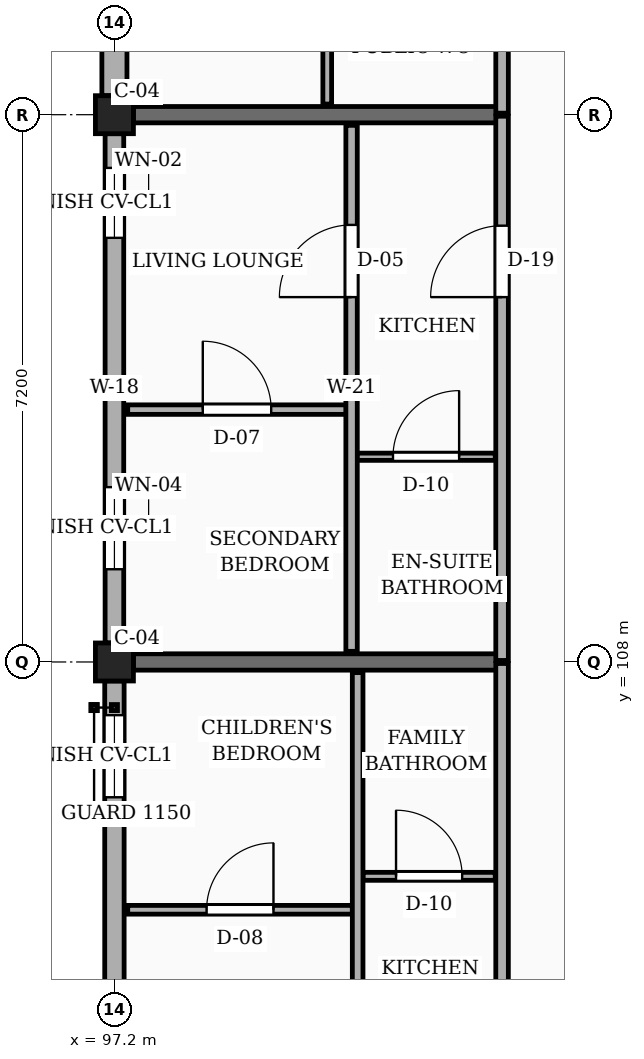
"""IFC4 building model, lengths in metres.
Left out: names, types, materials, properties, quantities, classifications, styles, units other than length and angle.
Written with IfcOpenShell. Run it as: python <this file> out.ifc"""

import sys

from ifc_helpers import new_model, si_unit, direction, frame, frame_2d, origin, origin_2d, place, context, subcontext, project, spatial, rectangle, extrude, element, fill, save


model = new_model("IFC4")
c1 = context("Model", 3, precision=1e-05, world=origin(), true_north=direction((0.0, 1.0)))
c2 = subcontext(c1, "Body", "Model", "MODEL_VIEW")
j1 = project(units=[si_unit("LENGTHUNIT", "METRE"), si_unit("PLANEANGLEUNIT", "RADIAN")], contexts=[c1])
p1 = place(None, origin())
s1 = spatial("IfcSite", under=j1, at=p1, CompositionType="ELEMENT")
p2 = place(p1, origin())
s2 = spatial("IfcBuilding", under=s1, at=p2, CompositionType="ELEMENT")
p3 = place(p2, frame((0.0, 0.0, 32.85)))
s3 = spatial("IfcBuildingStorey", under=s2, at=p3, CompositionType="ELEMENT", Elevation=32.85)
for number, where, z_axis, x_axis in (
    (1, (97.2, 108.0, 0.0), (0.0, 0.0, 1.0), (1.0, 0.0, 0.0)),
    (2, (97.2, 115.2, 0.0), (0.0, 0.0, 1.0), (1.0, 0.0, 0.0)),
):
    element("IfcColumn", number, at=place(p3, frame(where, z_axis=z_axis, x_axis=x_axis)), inside=s3, PredefinedType="COLUMN", context=c2, shape_type="SweptSolid", body=[
        extrude(rectangle(XDim=0.5, YDim=0.5, at=origin_2d()), origin(), (0.0, 0.0, 1.0), 3.15),
    ])
for number, where, z_axis, x_axis in (
    (3, (97.45, 108.0, 0.0), (0.0, 0.0, 1.0), (1.0, 0.0, 0.0)),
    (4, (97.45, 115.2, 0.0), (0.0, 0.0, 1.0), (1.0, 0.0, 0.0)),
):
    element("IfcWall", number, at=place(p3, frame(where, z_axis=z_axis, x_axis=x_axis)), inside=s3, PredefinedType="SOLIDWALL", context=c2, shape_type="SweptSolid", body=[
        extrude(rectangle(XDim=4.85, YDim=0.215, at=frame_2d((2.425, 0.0))), origin(), (0.0, 0.0, 1.0), 2.22),
    ])
p4 = place(p3, frame((97.2, 122.15, 0.0), z_axis=(0.0, 0.0, 1.0), x_axis=(0.0, -1.0, 0.0)))
e5 = element("IfcWall", 5, at=p4, inside=s3, PredefinedType="SOLIDWALL", context=c2, shape_type="SweptSolid", body=[
    extrude(rectangle(XDim=6.7, YDim=0.33, at=frame_2d((3.35, 0.0))), origin(), (0.0, 0.0, 1.0), 2.46),
])
p5 = place(p4, frame((0.45, 0.0, 0.78)))
e6 = element("IfcOpeningElement", 6, at=p5, cuts=e5, PredefinedType="OPENING", context=c2, shape_type="SweptSolid", body=[
    extrude(rectangle(XDim=1.45, YDim=1.44, at=frame_2d((0.725, 0.72))), frame((0.0, 0.175, 0.0), z_axis=(0.0, -1.0, 0.0), x_axis=(1.0, 0.0, 0.0)), (0.0, 0.0, 1.0), 0.35),
])
p6 = place(p4, frame((4.65, 0.0, 0.78)))
e7 = element("IfcOpeningElement", 7, at=p6, cuts=e5, PredefinedType="OPENING", context=c2, shape_type="SweptSolid", body=[
    extrude(rectangle(XDim=0.92, YDim=1.15, at=frame_2d((0.46, 0.575))), frame((0.0, 0.175, 0.0), z_axis=(0.0, -1.0, 0.0), x_axis=(1.0, 0.0, 0.0)), (0.0, 0.0, 1.0), 0.35),
])
p7 = place(p3, frame((97.2, 114.95, 0.0), z_axis=(0.0, 0.0, 1.0), x_axis=(0.0, -1.0, 0.0)))
e8 = element("IfcWall", 8, at=p7, inside=s3, PredefinedType="SOLIDWALL", context=c2, shape_type="SweptSolid", body=[
    extrude(rectangle(XDim=6.7, YDim=0.245, at=frame_2d((3.35, 0.0))), origin(), (0.0, 0.0, 1.0), 2.46),
])
p8 = place(p7, frame((0.45, 0.0, 0.78)))
e9 = element("IfcOpeningElement", 9, at=p8, cuts=e8, PredefinedType="OPENING", context=c2, shape_type="SweptSolid", body=[
    extrude(rectangle(XDim=0.92, YDim=1.15, at=frame_2d((0.46, 0.575))), frame((0.0, 0.133, 0.0), z_axis=(0.0, -1.0, 0.0), x_axis=(1.0, 0.0, 0.0)), (0.0, 0.0, 1.0), 0.265),
])
p9 = place(p7, frame((4.65, 0.0, 0.78)))
e10 = element("IfcOpeningElement", 10, at=p9, cuts=e8, PredefinedType="OPENING", context=c2, shape_type="SweptSolid", body=[
    extrude(rectangle(XDim=1.08, YDim=1.15, at=frame_2d((0.54, 0.575))), frame((0.0, 0.133, 0.0), z_axis=(0.0, -1.0, 0.0), x_axis=(1.0, 0.0, 0.0)), (0.0, 0.0, 1.0), 0.265),
])
p10 = place(p3, frame((97.2, 107.75, 0.0), z_axis=(0.0, 0.0, 1.0), x_axis=(0.0, -1.0, 0.0)))
e11 = element("IfcWall", 11, at=p10, inside=s3, PredefinedType="SOLIDWALL", context=c2, shape_type="SweptSolid", body=[
    extrude(rectangle(XDim=6.7, YDim=0.255, at=frame_2d((3.35, 0.0))), origin(), (0.0, 0.0, 1.0), 2.46),
])
p11 = place(p10, frame((0.45, 0.0, 0.78)))
e12 = element("IfcOpeningElement", 12, at=p11, cuts=e11, PredefinedType="OPENING", context=c2, shape_type="SweptSolid", body=[
    extrude(rectangle(XDim=1.08, YDim=1.15, at=frame_2d((0.54, 0.575))), frame((0.0, 0.137, 0.0), z_axis=(0.0, -1.0, 0.0), x_axis=(1.0, 0.0, 0.0)), (0.0, 0.0, 1.0), 0.275),
])
p12 = place(p10, frame((4.65, 0.0, 0.78)))
e13 = element("IfcOpeningElement", 13, at=p12, cuts=e11, PredefinedType="OPENING", context=c2, shape_type="SweptSolid", body=[
    extrude(rectangle(XDim=1.24, YDim=1.15, at=frame_2d((0.62, 0.575))), frame((0.0, 0.137, 0.0), z_axis=(0.0, -1.0, 0.0), x_axis=(1.0, 0.0, 0.0)), (0.0, 0.0, 1.0), 0.275),
])
p13 = place(p3, frame((102.3, 100.82, 0.0), z_axis=(0.0, 0.0, 1.0), x_axis=(0.0, 1.0, 0.0)))
e14 = element("IfcWall", 14, at=p13, inside=s3, PredefinedType="PARTITIONING", context=c2, shape_type="SweptSolid", body=[
    extrude(rectangle(XDim=7.16, YDim=0.165, at=frame_2d((3.58, 0.0))), origin(), (0.0, 0.0, 1.0), 2.325),
])
p14 = place(p13, frame((1.33, 0.0, 0.0)))
e15 = element("IfcOpeningElement", 15, at=p14, cuts=e14, PredefinedType="OPENING", context=c2, shape_type="SweptSolid", body=[
    extrude(rectangle(XDim=1.0, YDim=2.15, at=frame_2d((0.5, 1.075))), frame((0.0, 0.093, 0.0), z_axis=(0.0, -1.0, 0.0), x_axis=(1.0, 0.0, 0.0)), (0.0, 0.0, 1.0), 0.185),
])
p15 = place(p3, frame((102.3, 108.02, 0.0), z_axis=(0.0, 0.0, 1.0), x_axis=(0.0, 1.0, 0.0)))
e16 = element("IfcWall", 16, at=p15, inside=s3, PredefinedType="PARTITIONING", context=c2, shape_type="SweptSolid", body=[
    extrude(rectangle(XDim=7.16, YDim=0.165, at=frame_2d((3.58, 0.0))), origin(), (0.0, 0.0, 1.0), 2.325),
])
p16 = place(p15, frame((4.78, 0.0, 0.0)))
e17 = element("IfcOpeningElement", 17, at=p16, cuts=e16, PredefinedType="OPENING", context=c2, shape_type="SweptSolid", body=[
    extrude(rectangle(XDim=0.94, YDim=2.12, at=frame_2d((0.47, 1.06))), frame((0.0, 0.093, 0.0), z_axis=(0.0, -1.0, 0.0), x_axis=(1.0, 0.0, 0.0)), (0.0, 0.0, 1.0), 0.185),
])
p17 = place(p3, frame((102.3, 115.22, 0.0), z_axis=(0.0, 0.0, 1.0), x_axis=(0.0, 1.0, 0.0)))
e18 = element("IfcWall", 18, at=p17, inside=s3, PredefinedType="PARTITIONING", context=c2, shape_type="SweptSolid", body=[
    extrude(rectangle(XDim=7.005, YDim=0.165, at=frame_2d((3.502, 0.0))), origin(), (0.0, 0.0, 1.0), 2.325),
])
p18 = place(p17, frame((4.33, 0.0, 0.0)))
e19 = element("IfcOpeningElement", 19, at=p18, cuts=e18, PredefinedType="OPENING", context=c2, shape_type="SweptSolid", body=[
    extrude(rectangle(XDim=1.1, YDim=2.15, at=frame_2d((0.55, 1.075))), frame((0.0, 0.093, 0.0), z_axis=(0.0, -1.0, 0.0), x_axis=(1.0, 0.0, 0.0)), (0.0, 0.0, 1.0), 0.185),
])
p19 = place(p3, frame((97.375, 104.74, 0.0), z_axis=(0.0, 0.0, 1.0), x_axis=(1.0, 0.0, 0.0)))
e20 = element("IfcWall", 20, at=p19, inside=s3, PredefinedType="PARTITIONING", context=c2, shape_type="SweptSolid", body=[
    extrude(rectangle(XDim=2.955, YDim=0.115, at=frame_2d((1.478, 0.0))), origin(), (0.0, 0.0, 1.0), 2.325),
])
p20 = place(p19, frame((1.038, 0.0, 0.0)))
e21 = element("IfcOpeningElement", 21, at=p20, cuts=e20, PredefinedType="OPENING", context=c2, shape_type="SweptSolid", body=[
    extrude(rectangle(XDim=0.88, YDim=2.08, at=frame_2d((0.44, 1.04))), frame((0.0, 0.067, 0.0), z_axis=(0.0, -1.0, 0.0), x_axis=(1.0, 0.0, 0.0)), (0.0, 0.0, 1.0), 0.135),
])
p21 = place(p3, frame((100.47, 105.18, 0.0), z_axis=(0.0, 0.0, 1.0), x_axis=(1.0, 0.0, 0.0)))
e22 = element("IfcWall", 22, at=p21, inside=s3, PredefinedType="PARTITIONING", context=c2, shape_type="SweptSolid", body=[
    extrude(rectangle(XDim=1.74, YDim=0.105, at=frame_2d((0.87, 0.0))), origin(), (0.0, 0.0, 1.0), 2.325),
])
p22 = place(p21, frame((0.435, 0.0, 0.0)))
e23 = element("IfcOpeningElement", 23, at=p22, cuts=e22, PredefinedType="OPENING", context=c2, shape_type="SweptSolid", body=[
    extrude(rectangle(XDim=0.87, YDim=2.05, at=frame_2d((0.435, 1.025))), frame((0.0, 0.062, 0.0), z_axis=(0.0, -1.0, 0.0), x_axis=(1.0, 0.0, 0.0)), (0.0, 0.0, 1.0), 0.125),
])
p23 = place(p3, frame((100.4, 100.94, 0.0), z_axis=(0.0, 0.0, 1.0), x_axis=(0.0, 1.0, 0.0)))
e24 = element("IfcWall", 24, at=p23, inside=s3, PredefinedType="PARTITIONING", context=c2, shape_type="SweptSolid", body=[
    extrude(rectangle(XDim=6.92, YDim=0.14, at=frame_2d((3.46, 0.0))), origin(), (0.0, 0.0, 1.0), 2.325),
])
p24 = place(p23, frame((1.31, 0.0, 0.0)))
e25 = element("IfcOpeningElement", 25, at=p24, cuts=e24, PredefinedType="OPENING", context=c2, shape_type="SweptSolid", body=[
    extrude(rectangle(XDim=0.92, YDim=2.1, at=frame_2d((0.46, 1.05))), frame((0.0, 0.08, 0.0), z_axis=(0.0, -1.0, 0.0), x_axis=(1.0, 0.0, 0.0)), (0.0, 0.0, 1.0), 0.16),
])
p25 = place(p3, frame((97.375, 111.32, 0.0), z_axis=(0.0, 0.0, 1.0), x_axis=(1.0, 0.0, 0.0)))
e26 = element("IfcWall", 26, at=p25, inside=s3, PredefinedType="PARTITIONING", context=c2, shape_type="SweptSolid", body=[
    extrude(rectangle(XDim=2.875, YDim=0.125, at=frame_2d((1.438, 0.0))), origin(), (0.0, 0.0, 1.0), 2.325),
])
p26 = place(p25, frame((0.988, 0.0, 0.0)))
e27 = element("IfcOpeningElement", 27, at=p26, cuts=e26, PredefinedType="OPENING", context=c2, shape_type="SweptSolid", body=[
    extrude(rectangle(XDim=0.9, YDim=2.1, at=frame_2d((0.45, 1.05))), frame((0.0, 0.073, 0.0), z_axis=(0.0, -1.0, 0.0), x_axis=(1.0, 0.0, 0.0)), (0.0, 0.0, 1.0), 0.145),
])
p27 = place(p3, frame((100.39, 110.7, 0.0), z_axis=(0.0, 0.0, 1.0), x_axis=(1.0, 0.0, 0.0)))
e28 = element("IfcWall", 28, at=p27, inside=s3, PredefinedType="PARTITIONING", context=c2, shape_type="SweptSolid", body=[
    extrude(rectangle(XDim=1.82, YDim=0.095, at=frame_2d((0.91, 0.0))), origin(), (0.0, 0.0, 1.0), 2.325),
])
p28 = place(p27, frame((0.475, 0.0, 0.0)))
e29 = element("IfcOpeningElement", 29, at=p28, cuts=e28, PredefinedType="OPENING", context=c2, shape_type="SweptSolid", body=[
    extrude(rectangle(XDim=0.87, YDim=2.05, at=frame_2d((0.435, 1.025))), frame((0.0, 0.058, 0.0), z_axis=(0.0, -1.0, 0.0), x_axis=(1.0, 0.0, 0.0)), (0.0, 0.0, 1.0), 0.115),
])
p29 = place(p3, frame((100.32, 108.14, 0.0), z_axis=(0.0, 0.0, 1.0), x_axis=(0.0, 1.0, 0.0)))
e30 = element("IfcWall", 30, at=p29, inside=s3, PredefinedType="PARTITIONING", context=c2, shape_type="SweptSolid", body=[
    extrude(rectangle(XDim=6.92, YDim=0.15, at=frame_2d((3.46, 0.0))), origin(), (0.0, 0.0, 1.0), 2.325),
])
p30 = place(p29, frame((4.66, 0.0, 0.0)))
e31 = element("IfcOpeningElement", 31, at=p30, cuts=e30, PredefinedType="OPENING", context=c2, shape_type="SweptSolid", body=[
    extrude(rectangle(XDim=0.95, YDim=2.1, at=frame_2d((0.475, 1.05))), frame((0.0, 0.085, 0.0), z_axis=(0.0, -1.0, 0.0), x_axis=(1.0, 0.0, 0.0)), (0.0, 0.0, 1.0), 0.17),
])
p31 = place(p3, frame((100.0, 115.34, 0.0), z_axis=(0.0, 0.0, 1.0), x_axis=(0.0, 1.0, 0.0)))
e32 = element("IfcWall", 32, at=p31, inside=s3, PredefinedType="PARTITIONING", context=c2, shape_type="SweptSolid", body=[
    extrude(rectangle(XDim=2.41, YDim=0.115, at=frame_2d((1.205, 0.0))), origin(), (0.0, 0.0, 1.0), 2.325),
])
p32 = place(p8, origin())
e33 = element("IfcWindow", 33, at=p32, inside=s3, PartitioningType="SINGLE_PANEL", PredefinedType="WINDOW", context=c2, shape_type="SweptSolid", body=[
    extrude(rectangle(XDim=0.92, YDim=1.15, at=frame_2d((0.46, 0.575))), frame((0.0, 0.03, 0.0), z_axis=(0.0, -1.0, 0.0), x_axis=(1.0, 0.0, 0.0)), (0.0, 0.0, 1.0), 0.06),
])
fill(e9, e33)
p33 = place(p9, origin())
e34 = element("IfcWindow", 34, at=p33, inside=s3, PartitioningType="SINGLE_PANEL", PredefinedType="WINDOW", context=c2, shape_type="SweptSolid", body=[
    extrude(rectangle(XDim=1.08, YDim=1.15, at=frame_2d((0.54, 0.575))), frame((0.0, 0.03, 0.0), z_axis=(0.0, -1.0, 0.0), x_axis=(1.0, 0.0, 0.0)), (0.0, 0.0, 1.0), 0.06),
])
fill(e10, e34)
p34 = place(p11, origin())
e35 = element("IfcWindow", 35, at=p34, inside=s3, PartitioningType="SINGLE_PANEL", PredefinedType="WINDOW", context=c2, shape_type="SweptSolid", body=[
    extrude(rectangle(XDim=1.08, YDim=1.15, at=frame_2d((0.54, 0.575))), frame((0.0, 0.03, 0.0), z_axis=(0.0, -1.0, 0.0), x_axis=(1.0, 0.0, 0.0)), (0.0, 0.0, 1.0), 0.06),
])
fill(e12, e35)
p35 = place(p16, origin())
e36 = element("IfcDoor", 36, at=p35, inside=s3, OperationType="SINGLE_SWING_LEFT", PredefinedType="DOOR", context=c2, shape_type="SweptSolid", body=[
    extrude(rectangle(XDim=0.94, YDim=2.12, at=frame_2d((0.47, 1.06))), frame((0.0, 0.025, 0.0), z_axis=(0.0, -1.0, 0.0), x_axis=(1.0, 0.0, 0.0)), (0.0, 0.0, 1.0), 0.05),
])
fill(e17, e36)
p36 = place(p20, origin())
e37 = element("IfcDoor", 37, at=p36, inside=s3, OperationType="SINGLE_SWING_RIGHT", PredefinedType="DOOR", context=c2, shape_type="SweptSolid", body=[
    extrude(rectangle(XDim=0.88, YDim=2.08, at=frame_2d((0.44, 1.04))), frame((0.0, 0.025, 0.0), z_axis=(0.0, -1.0, 0.0), x_axis=(1.0, 0.0, 0.0)), (0.0, 0.0, 1.0), 0.05),
])
fill(e21, e37)
p37 = place(p22, origin())
e38 = element("IfcDoor", 38, at=p37, inside=s3, OperationType="SINGLE_SWING_LEFT", PredefinedType="DOOR", context=c2, shape_type="SweptSolid", body=[
    extrude(rectangle(XDim=0.87, YDim=2.05, at=frame_2d((0.435, 1.025))), frame((0.0, 0.025, 0.0), z_axis=(0.0, -1.0, 0.0), x_axis=(1.0, 0.0, 0.0)), (0.0, 0.0, 1.0), 0.05),
])
fill(e23, e38)
p38 = place(p26, origin())
e39 = element("IfcDoor", 39, at=p38, inside=s3, OperationType="SINGLE_SWING_LEFT", PredefinedType="DOOR", context=c2, shape_type="SweptSolid", body=[
    extrude(rectangle(XDim=0.9, YDim=2.1, at=frame_2d((0.45, 1.05))), frame((0.0, 0.025, 0.0), z_axis=(0.0, -1.0, 0.0), x_axis=(1.0, 0.0, 0.0)), (0.0, 0.0, 1.0), 0.05),
])
fill(e27, e39)
p39 = place(p28, origin())
e40 = element("IfcDoor", 40, at=p39, inside=s3, OperationType="SINGLE_SWING_RIGHT", PredefinedType="DOOR", context=c2, shape_type="SweptSolid", body=[
    extrude(rectangle(XDim=0.87, YDim=2.05, at=frame_2d((0.435, 1.025))), frame((0.0, 0.025, 0.0), z_axis=(0.0, -1.0, 0.0), x_axis=(1.0, 0.0, 0.0)), (0.0, 0.0, 1.0), 0.05),
])
fill(e29, e40)
p40 = place(p30, origin())
e41 = element("IfcDoor", 41, at=p40, inside=s3, OperationType="SINGLE_SWING_LEFT", PredefinedType="DOOR", context=c2, shape_type="SweptSolid", body=[
    extrude(rectangle(XDim=0.95, YDim=2.1, at=frame_2d((0.475, 1.05))), frame((0.0, 0.025, 0.0), z_axis=(0.0, -1.0, 0.0), x_axis=(1.0, 0.0, 0.0)), (0.0, 0.0, 1.0), 0.05),
])
fill(e31, e41)
save(model, sys.argv[1])
